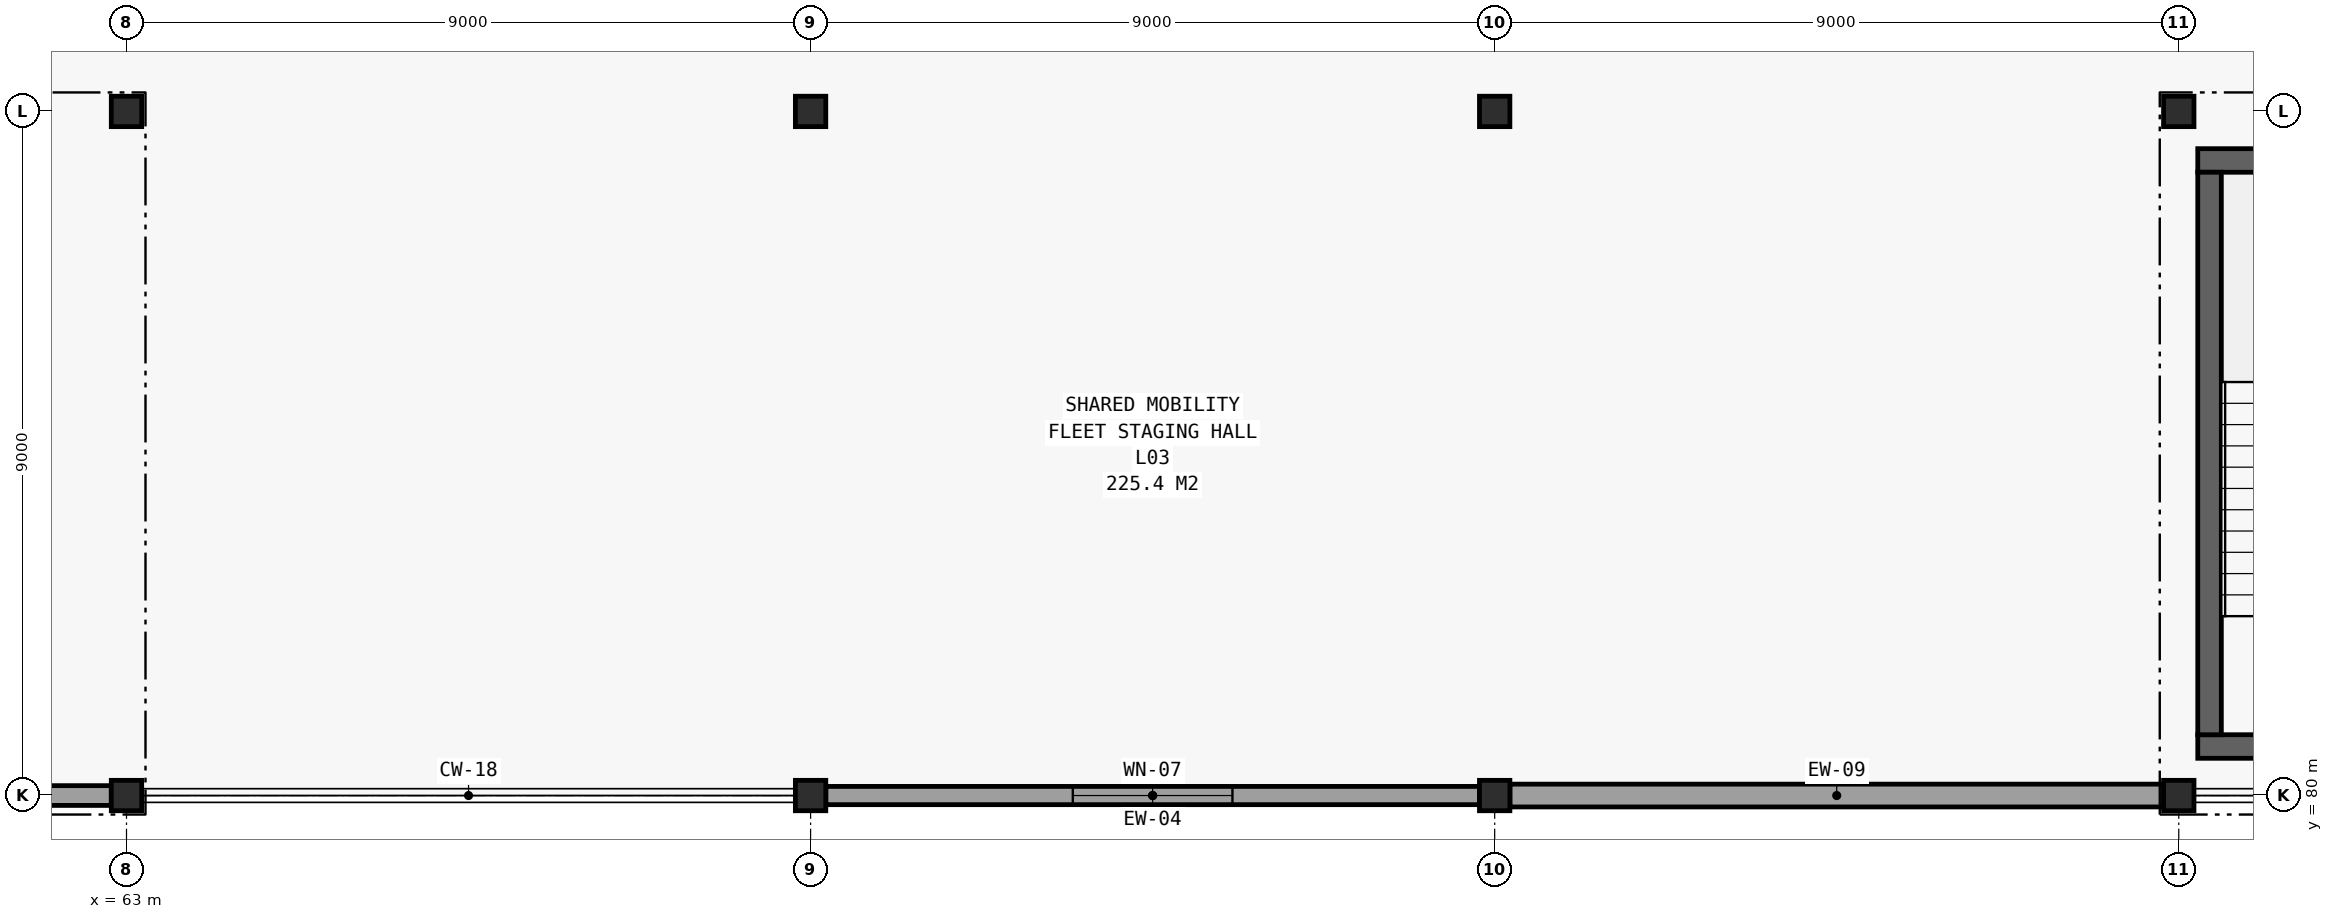
"""IFC4 building model, lengths in metres.
Left out: names, types, materials, properties, quantities, classifications, styles, units other than length and angle.
Written with IfcOpenShell. Run it as: python <this file> out.ifc"""

import sys

from ifc_helpers import new_model, si_unit, direction, frame, frame_2d, origin, origin_2d, place, context, subcontext, project, spatial, rectangle, hollow_rectangle, extrude, element, fill, save


model = new_model("IFC4")
c1 = context("Model", 3, precision=1e-05, world=origin(), true_north=direction((0.0, 1.0)))
c2 = subcontext(c1, "Body", "Model", "MODEL_VIEW")
j1 = project(units=[si_unit("LENGTHUNIT", "METRE"), si_unit("PLANEANGLEUNIT", "RADIAN")], contexts=[c1])
p1 = place(None, origin())
s1 = spatial("IfcSite", under=j1, at=p1, CompositionType="ELEMENT")
p2 = place(p1, origin())
s2 = spatial("IfcBuilding", under=s1, at=p2, CompositionType="ELEMENT")
p3 = place(p2, frame((0.0, 0.0, 13.5)))
s3 = spatial("IfcBuildingStorey", under=s2, at=p3, CompositionType="ELEMENT", Elevation=13.5)
for number, where, z_axis, x_axis in (
    (1, (63.0, 80.0, 0.0), (0.0, 0.0, 1.0), (1.0, 0.0, 0.0)),
    (2, (63.0, 89.0, 0.0), (0.0, 0.0, 1.0), (1.0, 0.0, 0.0)),
    (3, (72.0, 80.0, 0.0), (0.0, 0.0, 1.0), (1.0, 0.0, 0.0)),
    (4, (72.0, 89.0, 0.0), (0.0, 0.0, 1.0), (1.0, 0.0, 0.0)),
    (5, (81.0, 80.0, 0.0), (0.0, 0.0, 1.0), (1.0, 0.0, 0.0)),
    (6, (81.0, 89.0, 0.0), (0.0, 0.0, 1.0), (1.0, 0.0, 0.0)),
    (7, (90.0, 80.0, 0.0), (0.0, 0.0, 1.0), (1.0, 0.0, 0.0)),
    (8, (90.0, 89.0, 0.0), (0.0, 0.0, 1.0), (1.0, 0.0, 0.0)),
):
    element("IfcColumn", number, at=place(p3, frame(where, z_axis=z_axis, x_axis=x_axis)), inside=s3, PredefinedType="COLUMN", context=c2, shape_type="SweptSolid", body=[
        extrude(hollow_rectangle(XDim=0.4, YDim=0.4, WallThickness=0.019, at=origin_2d()), origin(), (0.0, 0.0, 1.0), 4.2),
    ])
p4 = place(p3, frame((54.1, 80.0, 0.0), z_axis=(0.0, 0.0, 1.0), x_axis=(1.0, 0.0, 0.0)))
e9 = element("IfcWall", 9, at=p4, inside=s3, PredefinedType="SOLIDWALL", context=c2, shape_type="SweptSolid", body=[
    extrude(rectangle(XDim=8.7, YDim=0.26, at=frame_2d((4.35, 0.0))), origin(), (0.0, 0.0, 1.0), 3.25),
])
p5 = place(p4, frame((3.15, 0.0, 0.95)))
e10 = element("IfcOpeningElement", 10, at=p5, cuts=e9, PredefinedType="OPENING", context=c2, shape_type="SweptSolid", body=[
    extrude(rectangle(XDim=2.4, YDim=1.3, at=frame_2d((1.2, 0.65))), frame((0.0, 0.141, 0.0), z_axis=(0.0, -1.0, 0.0), x_axis=(1.0, 0.0, 0.0)), (0.0, 0.0, 1.0), 0.282),
])
p6 = place(p3, frame((72.2, 80.0, 0.0), z_axis=(0.0, 0.0, 1.0), x_axis=(1.0, 0.0, 0.0)))
e11 = element("IfcWall", 11, at=p6, inside=s3, PredefinedType="SOLIDWALL", context=c2, shape_type="SweptSolid", body=[
    extrude(rectangle(XDim=8.6, YDim=0.24, at=frame_2d((4.3, 0.0))), origin(), (0.0, 0.0, 1.0), 3.25),
])
p7 = place(p6, frame((3.25, 0.0, 0.95)))
e12 = element("IfcOpeningElement", 12, at=p7, cuts=e11, PredefinedType="OPENING", context=c2, shape_type="SweptSolid", body=[
    extrude(rectangle(XDim=2.1, YDim=1.3, at=frame_2d((1.05, 0.65))), frame((0.0, 0.131, 0.0), z_axis=(0.0, -1.0, 0.0), x_axis=(1.0, 0.0, 0.0)), (0.0, 0.0, 1.0), 0.262),
])
p8 = place(p3, frame((81.2, 80.0, 0.0), z_axis=(0.0, 0.0, 1.0), x_axis=(1.0, 0.0, 0.0)))
e13 = element("IfcWall", 13, at=p8, inside=s3, PredefinedType="SOLIDWALL", context=c2, shape_type="SweptSolid", body=[
    extrude(rectangle(XDim=8.6, YDim=0.3, at=frame_2d((4.3, 0.0))), origin(), (0.0, 0.0, 1.0), 3.25),
])
for number, where, z_axis, x_axis in (
    (14, (90.25, 80.645, 0.0), (0.0, 0.0, 1.0), (1.0, 0.0, 0.0)),
    (15, (90.25, 88.355, 0.0), (0.0, 0.0, 1.0), (1.0, 0.0, 0.0)),
):
    element("IfcWall", number, at=place(p3, frame(where, z_axis=z_axis, x_axis=x_axis)), inside=s3, PredefinedType="SHEAR", context=c2, shape_type="SweptSolid", body=[
        extrude(rectangle(XDim=3.9, YDim=0.31, at=frame_2d((1.95, 0.0))), origin(), (0.0, 0.0, 1.0), 3.94),
    ])
p9 = place(p3, frame((90.405, 80.8, 0.0), z_axis=(0.0, 0.0, 1.0), x_axis=(0.0, 1.0, 0.0)))
e16 = element("IfcWall", 16, at=p9, inside=s3, PredefinedType="SHEAR", context=c2, shape_type="SweptSolid", body=[
    extrude(rectangle(XDim=7.4, YDim=0.31, at=frame_2d((3.7, 0.0))), origin(), (0.0, 0.0, 1.0), 3.94),
])
p10 = place(p7, origin())
e17 = element("IfcWindow", 17, at=p10, inside=s3, PartitioningType="SINGLE_PANEL", PredefinedType="WINDOW", context=c2, shape_type="SweptSolid", body=[
    extrude(rectangle(XDim=2.1, YDim=1.3, at=frame_2d((1.05, 0.65))), frame((0.0, 0.03, 0.0), z_axis=(0.0, -1.0, 0.0), x_axis=(1.0, 0.0, 0.0)), (0.0, 0.0, 1.0), 0.06),
])
fill(e12, e17)
save(model, sys.argv[1])
